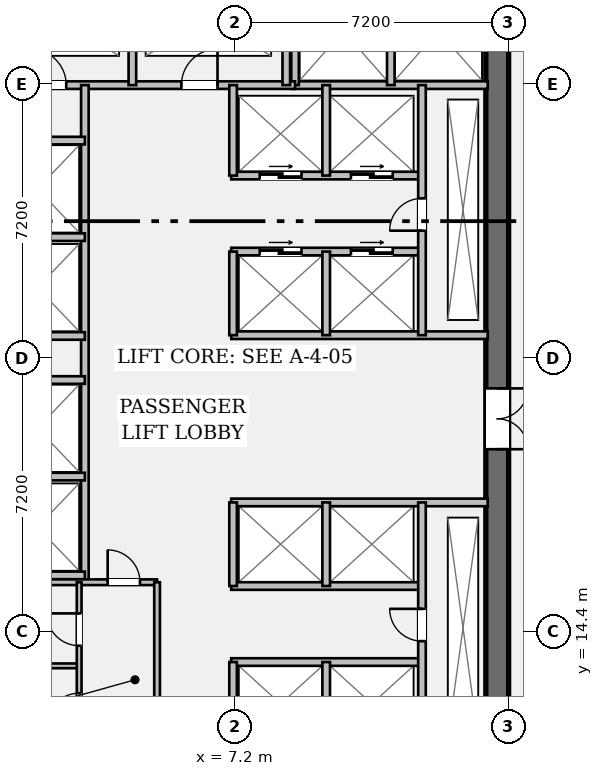
"""IFC4 building model, lengths in metres.
Left out: names, types, materials, properties, quantities, classifications, styles, units other than length and angle.
Written with IfcOpenShell. Run it as: python <this file> out.ifc"""

import sys

from ifc_helpers import new_model, si_unit, direction, frame, frame_2d, origin, place, context, subcontext, project, spatial, rectangle, extrude, element, fill, save


model = new_model("IFC4")
c1 = context("Model", 3, precision=1e-05, world=origin(), true_north=direction((0.0, 1.0)))
c2 = subcontext(c1, "Body", "Model", "MODEL_VIEW")
j1 = project(units=[si_unit("LENGTHUNIT", "METRE"), si_unit("PLANEANGLEUNIT", "RADIAN")], contexts=[c1])
p1 = place(None, origin())
s1 = spatial("IfcSite", under=j1, at=p1, CompositionType="ELEMENT")
p2 = place(p1, origin())
s2 = spatial("IfcBuilding", under=s1, at=p2, CompositionType="ELEMENT")
p3 = place(p2, frame((0.0, 0.0, 61.95)))
s3 = spatial("IfcBuildingStorey", under=s2, at=p3, CompositionType="ELEMENT", Elevation=61.95)
p4 = place(p3, frame((14.1, 35.4, 0.0), z_axis=(0.0, 0.0, 1.0), x_axis=(0.0, -1.0, 0.0)))
e1 = element("IfcWall", 1, at=p4, inside=s3, PredefinedType="SHEAR", context=c2, shape_type="SweptSolid", body=[
    extrude(rectangle(XDim=27.6, YDim=0.6, at=frame_2d((13.8, 0.0))), origin(), (0.0, 0.0, 1.0), 3.57),
])
p5 = place(p4, frame((1.3, 0.0, 0.0)))
e2 = element("IfcOpeningElement", 2, at=p5, cuts=e1, PredefinedType="OPENING", context=c2, shape_type="SweptSolid", body=[
    extrude(rectangle(XDim=1.2, YDim=2.15, at=frame_2d((0.6, 1.075))), frame((0.0, 0.312, 0.0), z_axis=(0.0, -1.0, 0.0), x_axis=(1.0, 0.0, 0.0)), (0.0, 0.0, 1.0), 0.624),
])
p6 = place(p4, frame((25.25, 0.0, 0.0)))
e3 = element("IfcOpeningElement", 3, at=p6, cuts=e1, PredefinedType="OPENING", context=c2, shape_type="SweptSolid", body=[
    extrude(rectangle(XDim=1.2, YDim=2.15, at=frame_2d((0.6, 1.075))), frame((0.0, 0.312, 0.0), z_axis=(0.0, -1.0, 0.0), x_axis=(1.0, 0.0, 0.0)), (0.0, 0.0, 1.0), 0.624),
])
p7 = place(p4, frame((14.6, 0.0, 0.0)))
e4 = element("IfcOpeningElement", 4, at=p7, cuts=e1, PredefinedType="OPENING", context=c2, shape_type="SweptSolid", body=[
    extrude(rectangle(XDim=1.6, YDim=2.2, at=frame_2d((0.8, 1.1))), frame((0.0, 0.312, 0.0), z_axis=(0.0, -1.0, 0.0), x_axis=(1.0, 0.0, 0.0)), (0.0, 0.0, 1.0), 0.624),
])
p8 = place(p3, frame((8.7, 28.78, 0.0), z_axis=(0.0, 0.0, 1.0), x_axis=(1.0, 0.0, 0.0)))
e5 = element("IfcWall", 5, at=p8, inside=s3, PredefinedType="PARTITIONING", context=c2, shape_type="SweptSolid", body=[
    extrude(rectangle(XDim=5.15, YDim=0.2, at=frame_2d((2.575, 0.0))), origin(), (0.0, 0.0, 1.0), 3.57),
])
for number, where, z_axis, x_axis in (
    (6, (8.78, 28.78, 0.0), (0.0, 0.0, 1.0), (0.0, 1.0, 0.0)),
    (7, (11.3, 28.78, 0.0), (0.0, 0.0, 1.0), (0.0, 1.0, 0.0)),
):
    element("IfcWall", number, at=place(p3, frame(where, z_axis=z_axis, x_axis=x_axis)), inside=s3, PredefinedType="PARTITIONING", context=c2, shape_type="SweptSolid", body=[
        extrude(rectangle(XDim=3.1, YDim=0.2, at=frame_2d((1.55, 0.0))), origin(), (0.0, 0.0, 1.0), 3.57),
    ])
p9 = place(p3, frame((0.6, 28.78, 0.0), z_axis=(0.0, 0.0, 1.0), x_axis=(1.0, 0.0, 0.0)))
e8 = element("IfcWall", 8, at=p9, inside=s3, PredefinedType="PARTITIONING", context=c2, shape_type="SweptSolid", body=[
    extrude(rectangle(XDim=8.18, YDim=0.2, at=frame_2d((4.09, 0.0))), origin(), (0.0, 0.0, 1.0), 3.57),
])
p10 = place(p9, frame((1.21, 0.0, 0.0)))
e9 = element("IfcOpeningElement", 9, at=p10, cuts=e8, PredefinedType="OPENING", context=c2, shape_type="SweptSolid", body=[
    extrude(rectangle(XDim=0.95, YDim=2.15, at=frame_2d((0.475, 1.075))), frame((0.0, 0.112, 0.0), z_axis=(0.0, -1.0, 0.0), x_axis=(1.0, 0.0, 0.0)), (0.0, 0.0, 1.0), 0.224),
])
p11 = place(p9, frame((5.19, 0.0, 0.0)))
e10 = element("IfcOpeningElement", 10, at=p11, cuts=e8, PredefinedType="OPENING", context=c2, shape_type="SweptSolid", body=[
    extrude(rectangle(XDim=0.95, YDim=2.15, at=frame_2d((0.475, 1.075))), frame((0.0, 0.112, 0.0), z_axis=(0.0, -1.0, 0.0), x_axis=(1.0, 0.0, 0.0)), (0.0, 0.0, 1.0), 0.224),
])
for number, where, z_axis, x_axis in (
    (11, (4.5, 28.78, 0.0), (0.0, 0.0, 1.0), (0.0, 1.0, 0.0)),
    (12, (8.55, 28.78, 0.0), (0.0, 0.0, 1.0), (0.0, 1.0, 0.0)),
):
    element("IfcWall", number, at=place(p3, frame(where, z_axis=z_axis, x_axis=x_axis)), inside=s3, PredefinedType="PARTITIONING", context=c2, shape_type="SweptSolid", body=[
        extrude(rectangle(XDim=2.94, YDim=0.2, at=frame_2d((1.47, 0.0))), origin(), (0.0, 0.0, 1.0), 3.57),
    ])
p12 = place(p3, frame((3.25, 15.7, 0.0), z_axis=(0.0, 0.0, 1.0), x_axis=(0.0, 1.0, 0.0)))
e13 = element("IfcWall", 13, at=p12, inside=s3, PredefinedType="PARTITIONING", context=c2, shape_type="SweptSolid", body=[
    extrude(rectangle(XDim=13.08, YDim=0.2, at=frame_2d((6.54, 0.0))), origin(), (0.0, 0.0, 1.0), 3.57),
])
for number, where, z_axis, x_axis in (
    (14, (0.6, 15.88, 0.0), (0.0, 0.0, 1.0), (1.0, 0.0, 0.0)),
    (15, (0.6, 18.48, 0.0), (0.0, 0.0, 1.0), (1.0, 0.0, 0.0)),
    (16, (0.6, 22.18, 0.0), (0.0, 0.0, 1.0), (1.0, 0.0, 0.0)),
    (17, (0.6, 24.78, 0.0), (0.0, 0.0, 1.0), (1.0, 0.0, 0.0)),
    (18, (0.6, 21.02, 0.0), (0.0, 0.0, 1.0), (1.0, 0.0, 0.0)),
    (19, (0.6, 27.32, 0.0), (0.0, 0.0, 1.0), (1.0, 0.0, 0.0)),
):
    element("IfcWall", number, at=place(p3, frame(where, z_axis=z_axis, x_axis=x_axis)), inside=s3, PredefinedType="PARTITIONING", context=c2, shape_type="SweptSolid", body=[
        extrude(rectangle(XDim=2.65, YDim=0.2, at=frame_2d((1.325, 0.0))), origin(), (0.0, 0.0, 1.0), 3.57),
    ])
p13 = place(p3, frame((7.1, 22.2, 0.0), z_axis=(0.0, 0.0, 1.0), x_axis=(1.0, 0.0, 0.0)))
e20 = element("IfcWall", 20, at=p13, inside=s3, PredefinedType="PARTITIONING", context=c2, shape_type="SweptSolid", body=[
    extrude(rectangle(XDim=6.75, YDim=0.2, at=frame_2d((3.375, 0.0))), origin(), (0.0, 0.0, 1.0), 3.57),
])
p14 = place(p3, frame((7.1, 24.4, 0.0), z_axis=(0.0, 0.0, 1.0), x_axis=(1.0, 0.0, 0.0)))
e21 = element("IfcWall", 21, at=p14, inside=s3, PredefinedType="PARTITIONING", context=c2, shape_type="SweptSolid", body=[
    extrude(rectangle(XDim=5.02, YDim=0.2, at=frame_2d((2.51, 0.0))), origin(), (0.0, 0.0, 1.0), 3.57),
])
p15 = place(p14, frame((0.75, 0.0, 0.0)))
e22 = element("IfcOpeningElement", 22, at=p15, cuts=e21, PredefinedType="OPENING", context=c2, shape_type="SweptSolid", body=[
    extrude(rectangle(XDim=1.1, YDim=2.2, at=frame_2d((0.55, 1.1))), frame((0.0, 0.112, 0.0), z_axis=(0.0, -1.0, 0.0), x_axis=(1.0, 0.0, 0.0)), (0.0, 0.0, 1.0), 0.224),
])
p16 = place(p14, frame((3.15, 0.0, 0.0)))
e23 = element("IfcOpeningElement", 23, at=p16, cuts=e21, PredefinedType="OPENING", context=c2, shape_type="SweptSolid", body=[
    extrude(rectangle(XDim=1.1, YDim=2.2, at=frame_2d((0.55, 1.1))), frame((0.0, 0.112, 0.0), z_axis=(0.0, -1.0, 0.0), x_axis=(1.0, 0.0, 0.0)), (0.0, 0.0, 1.0), 0.224),
])
p17 = place(p3, frame((7.1, 26.4, 0.0), z_axis=(0.0, 0.0, 1.0), x_axis=(1.0, 0.0, 0.0)))
e24 = element("IfcWall", 24, at=p17, inside=s3, PredefinedType="PARTITIONING", context=c2, shape_type="SweptSolid", body=[
    extrude(rectangle(XDim=5.02, YDim=0.2, at=frame_2d((2.51, 0.0))), origin(), (0.0, 0.0, 1.0), 3.57),
])
p18 = place(p17, frame((0.75, 0.0, 0.0)))
e25 = element("IfcOpeningElement", 25, at=p18, cuts=e24, PredefinedType="OPENING", context=c2, shape_type="SweptSolid", body=[
    extrude(rectangle(XDim=1.1, YDim=2.2, at=frame_2d((0.55, 1.1))), frame((0.0, 0.112, 0.0), z_axis=(0.0, -1.0, 0.0), x_axis=(1.0, 0.0, 0.0)), (0.0, 0.0, 1.0), 0.224),
])
p19 = place(p17, frame((3.15, 0.0, 0.0)))
e26 = element("IfcOpeningElement", 26, at=p19, cuts=e24, PredefinedType="OPENING", context=c2, shape_type="SweptSolid", body=[
    extrude(rectangle(XDim=1.1, YDim=2.2, at=frame_2d((0.55, 1.1))), frame((0.0, 0.112, 0.0), z_axis=(0.0, -1.0, 0.0), x_axis=(1.0, 0.0, 0.0)), (0.0, 0.0, 1.0), 0.224),
])
p20 = place(p3, frame((7.15, 22.2, 0.0), z_axis=(0.0, 0.0, 1.0), x_axis=(0.0, 1.0, 0.0)))
e27 = element("IfcWall", 27, at=p20, inside=s3, PredefinedType="PARTITIONING", context=c2, shape_type="SweptSolid", body=[
    extrude(rectangle(XDim=2.2, YDim=0.2, at=frame_2d((1.1, 0.0))), origin(), (0.0, 0.0, 1.0), 3.57),
])
p21 = place(p3, frame((7.15, 26.4, 0.0), z_axis=(0.0, 0.0, 1.0), x_axis=(0.0, 1.0, 0.0)))
e28 = element("IfcWall", 28, at=p21, inside=s3, PredefinedType="PARTITIONING", context=c2, shape_type="SweptSolid", body=[
    extrude(rectangle(XDim=2.38, YDim=0.2, at=frame_2d((1.19, 0.0))), origin(), (0.0, 0.0, 1.0), 3.57),
])
p22 = place(p3, frame((9.6, 22.2, 0.0), z_axis=(0.0, 0.0, 1.0), x_axis=(0.0, 1.0, 0.0)))
e29 = element("IfcWall", 29, at=p22, inside=s3, PredefinedType="PARTITIONING", context=c2, shape_type="SweptSolid", body=[
    extrude(rectangle(XDim=2.2, YDim=0.2, at=frame_2d((1.1, 0.0))), origin(), (0.0, 0.0, 1.0), 3.57),
])
p23 = place(p3, frame((9.6, 26.4, 0.0), z_axis=(0.0, 0.0, 1.0), x_axis=(0.0, 1.0, 0.0)))
e30 = element("IfcWall", 30, at=p23, inside=s3, PredefinedType="PARTITIONING", context=c2, shape_type="SweptSolid", body=[
    extrude(rectangle(XDim=2.38, YDim=0.2, at=frame_2d((1.19, 0.0))), origin(), (0.0, 0.0, 1.0), 3.57),
])
p24 = place(p3, frame((12.12, 22.2, 0.0), z_axis=(0.0, 0.0, 1.0), x_axis=(0.0, 1.0, 0.0)))
e31 = element("IfcWall", 31, at=p24, inside=s3, PredefinedType="PARTITIONING", context=c2, shape_type="SweptSolid", body=[
    extrude(rectangle(XDim=6.58, YDim=0.2, at=frame_2d((3.29, 0.0))), origin(), (0.0, 0.0, 1.0), 3.57),
])
p25 = place(p24, frame((2.75, 0.0, 0.0)))
e32 = element("IfcOpeningElement", 32, at=p25, cuts=e31, PredefinedType="OPENING", context=c2, shape_type="SweptSolid", body=[
    extrude(rectangle(XDim=0.85, YDim=2.15, at=frame_2d((0.425, 1.075))), frame((0.0, 0.112, 0.0), z_axis=(0.0, -1.0, 0.0), x_axis=(1.0, 0.0, 0.0)), (0.0, 0.0, 1.0), 0.224),
])
p26 = place(p3, frame((7.1, 17.8, 0.0), z_axis=(0.0, 0.0, 1.0), x_axis=(1.0, 0.0, 0.0)))
e33 = element("IfcWall", 33, at=p26, inside=s3, PredefinedType="PARTITIONING", context=c2, shape_type="SweptSolid", body=[
    extrude(rectangle(XDim=6.75, YDim=0.2, at=frame_2d((3.375, 0.0))), origin(), (0.0, 0.0, 1.0), 3.57),
])
for number, where, z_axis, x_axis in (
    (34, (7.1, 15.6, 0.0), (0.0, 0.0, 1.0), (1.0, 0.0, 0.0)),
    (35, (7.1, 13.6, 0.0), (0.0, 0.0, 1.0), (1.0, 0.0, 0.0)),
):
    element("IfcWall", number, at=place(p3, frame(where, z_axis=z_axis, x_axis=x_axis)), inside=s3, PredefinedType="PARTITIONING", context=c2, shape_type="SweptSolid", body=[
        extrude(rectangle(XDim=5.02, YDim=0.2, at=frame_2d((2.51, 0.0))), origin(), (0.0, 0.0, 1.0), 3.57),
    ])
p27 = place(p3, frame((7.15, 15.6, 0.0), z_axis=(0.0, 0.0, 1.0), x_axis=(0.0, 1.0, 0.0)))
e36 = element("IfcWall", 36, at=p27, inside=s3, PredefinedType="PARTITIONING", context=c2, shape_type="SweptSolid", body=[
    extrude(rectangle(XDim=2.2, YDim=0.2, at=frame_2d((1.1, 0.0))), origin(), (0.0, 0.0, 1.0), 3.57),
])
p28 = place(p3, frame((7.15, 11.2, 0.0), z_axis=(0.0, 0.0, 1.0), x_axis=(0.0, 1.0, 0.0)))
e37 = element("IfcWall", 37, at=p28, inside=s3, PredefinedType="PARTITIONING", context=c2, shape_type="SweptSolid", body=[
    extrude(rectangle(XDim=2.4, YDim=0.2, at=frame_2d((1.2, 0.0))), origin(), (0.0, 0.0, 1.0), 3.57),
])
p29 = place(p3, frame((9.6, 15.6, 0.0), z_axis=(0.0, 0.0, 1.0), x_axis=(0.0, 1.0, 0.0)))
e38 = element("IfcWall", 38, at=p29, inside=s3, PredefinedType="PARTITIONING", context=c2, shape_type="SweptSolid", body=[
    extrude(rectangle(XDim=2.2, YDim=0.2, at=frame_2d((1.1, 0.0))), origin(), (0.0, 0.0, 1.0), 3.57),
])
p30 = place(p3, frame((9.6, 11.2, 0.0), z_axis=(0.0, 0.0, 1.0), x_axis=(0.0, 1.0, 0.0)))
e39 = element("IfcWall", 39, at=p30, inside=s3, PredefinedType="PARTITIONING", context=c2, shape_type="SweptSolid", body=[
    extrude(rectangle(XDim=2.4, YDim=0.2, at=frame_2d((1.2, 0.0))), origin(), (0.0, 0.0, 1.0), 3.57),
])
p31 = place(p3, frame((12.12, 11.2, 0.0), z_axis=(0.0, 0.0, 1.0), x_axis=(0.0, 1.0, 0.0)))
e40 = element("IfcWall", 40, at=p31, inside=s3, PredefinedType="PARTITIONING", context=c2, shape_type="SweptSolid", body=[
    extrude(rectangle(XDim=6.6, YDim=0.2, at=frame_2d((3.3, 0.0))), origin(), (0.0, 0.0, 1.0), 3.57),
])
p32 = place(p31, frame((2.95, 0.0, 0.0)))
e41 = element("IfcOpeningElement", 41, at=p32, cuts=e40, PredefinedType="OPENING", context=c2, shape_type="SweptSolid", body=[
    extrude(rectangle(XDim=0.85, YDim=2.15, at=frame_2d((0.425, 1.075))), frame((0.0, 0.112, 0.0), z_axis=(0.0, -1.0, 0.0), x_axis=(1.0, 0.0, 0.0)), (0.0, 0.0, 1.0), 0.224),
])
p33 = place(p3, frame((0.6, 15.7, 0.0), z_axis=(0.0, 0.0, 1.0), x_axis=(1.0, 0.0, 0.0)))
e42 = element("IfcWall", 42, at=p33, inside=s3, PredefinedType="PARTITIONING", context=c2, shape_type="SweptSolid", body=[
    extrude(rectangle(XDim=4.55, YDim=0.15, at=frame_2d((2.275, 0.0))), origin(), (0.0, 0.0, 1.0), 3.57),
])
p34 = place(p33, frame((3.25, 0.0, 0.0)))
e43 = element("IfcOpeningElement", 43, at=p34, cuts=e42, PredefinedType="OPENING", context=c2, shape_type="SweptSolid", body=[
    extrude(rectangle(XDim=0.85, YDim=2.15, at=frame_2d((0.425, 1.075))), frame((0.0, 0.087, 0.0), z_axis=(0.0, -1.0, 0.0), x_axis=(1.0, 0.0, 0.0)), (0.0, 0.0, 1.0), 0.174),
])
p35 = place(p3, frame((5.15, 11.28, 0.0), z_axis=(0.0, 0.0, 1.0), x_axis=(0.0, 1.0, 0.0)))
e44 = element("IfcWall", 44, at=p35, inside=s3, PredefinedType="PARTITIONING", context=c2, shape_type="SweptSolid", body=[
    extrude(rectangle(XDim=4.42, YDim=0.15, at=frame_2d((2.21, 0.0))), origin(), (0.0, 0.0, 1.0), 3.57),
])
p36 = place(p3, frame((0.6, 13.5, 0.0), z_axis=(0.0, 0.0, 1.0), x_axis=(1.0, 0.0, 0.0)))
e45 = element("IfcWall", 45, at=p36, inside=s3, PredefinedType="PARTITIONING", context=c2, shape_type="SweptSolid", body=[
    extrude(rectangle(XDim=2.5, YDim=0.125, at=frame_2d((1.25, 0.0))), origin(), (0.0, 0.0, 1.0), 3.57),
])
p37 = place(p3, frame((3.1, 11.28, 0.0), z_axis=(0.0, 0.0, 1.0), x_axis=(0.0, 1.0, 0.0)))
e46 = element("IfcWall", 46, at=p37, inside=s3, PredefinedType="PARTITIONING", context=c2, shape_type="SweptSolid", body=[
    extrude(rectangle(XDim=4.42, YDim=0.125, at=frame_2d((2.21, 0.0))), origin(), (0.0, 0.0, 1.0), 3.57),
])
p38 = place(p37, frame((0.65, 0.0, 0.0)))
e47 = element("IfcOpeningElement", 47, at=p38, cuts=e46, PredefinedType="OPENING", context=c2, shape_type="SweptSolid", body=[
    extrude(rectangle(XDim=0.85, YDim=2.15, at=frame_2d((0.425, 1.075))), frame((0.0, 0.074, 0.0), z_axis=(0.0, -1.0, 0.0), x_axis=(1.0, 0.0, 0.0)), (0.0, 0.0, 1.0), 0.149),
])
p39 = place(p37, frame((2.75, 0.0, 0.0)))
e48 = element("IfcOpeningElement", 48, at=p39, cuts=e46, PredefinedType="OPENING", context=c2, shape_type="SweptSolid", body=[
    extrude(rectangle(XDim=0.85, YDim=2.15, at=frame_2d((0.425, 1.075))), frame((0.0, 0.074, 0.0), z_axis=(0.0, -1.0, 0.0), x_axis=(1.0, 0.0, 0.0)), (0.0, 0.0, 1.0), 0.149),
])
p40 = place(p10, origin())
e49 = element("IfcDoor", 49, at=p40, inside=s3, OperationType="SINGLE_SWING_LEFT", PredefinedType="DOOR", context=c2, shape_type="SweptSolid", body=[
    extrude(rectangle(XDim=0.95, YDim=2.15, at=frame_2d((0.475, 1.075))), frame((0.0, 0.025, 0.0), z_axis=(0.0, -1.0, 0.0), x_axis=(1.0, 0.0, 0.0)), (0.0, 0.0, 1.0), 0.05),
])
fill(e9, e49)
p41 = place(p11, origin())
e50 = element("IfcDoor", 50, at=p41, inside=s3, OperationType="SINGLE_SWING_RIGHT", PredefinedType="DOOR", context=c2, shape_type="SweptSolid", body=[
    extrude(rectangle(XDim=0.95, YDim=2.15, at=frame_2d((0.475, 1.075))), frame((0.0, 0.025, 0.0), z_axis=(0.0, -1.0, 0.0), x_axis=(1.0, 0.0, 0.0)), (0.0, 0.0, 1.0), 0.05),
])
fill(e10, e50)
p42 = place(p7, origin())
e51 = element("IfcDoor", 51, at=p42, inside=s3, OperationType="DOUBLE_DOOR_SINGLE_SWING", PredefinedType="DOOR", context=c2, shape_type="SweptSolid", body=[
    extrude(rectangle(XDim=1.6, YDim=2.2, at=frame_2d((0.8, 1.1))), frame((0.0, 0.025, 0.0), z_axis=(0.0, -1.0, 0.0), x_axis=(1.0, 0.0, 0.0)), (0.0, 0.0, 1.0), 0.05),
])
fill(e4, e51)
p43 = place(p25, origin())
e52 = element("IfcDoor", 52, at=p43, inside=s3, OperationType="SINGLE_SWING_LEFT", PredefinedType="DOOR", context=c2, shape_type="SweptSolid", body=[
    extrude(rectangle(XDim=0.85, YDim=2.15, at=frame_2d((0.425, 1.075))), frame((0.0, 0.025, 0.0), z_axis=(0.0, -1.0, 0.0), x_axis=(1.0, 0.0, 0.0)), (0.0, 0.0, 1.0), 0.05),
])
fill(e32, e52)
p44 = place(p15, origin())
e53 = element("IfcDoor", 53, at=p44, inside=s3, OperationType="DOUBLE_DOOR_SLIDING", PredefinedType="DOOR", context=c2, shape_type="SweptSolid", body=[
    extrude(rectangle(XDim=1.1, YDim=2.2, at=frame_2d((0.55, 1.1))), frame((0.0, 0.025, 0.0), z_axis=(0.0, -1.0, 0.0), x_axis=(1.0, 0.0, 0.0)), (0.0, 0.0, 1.0), 0.05),
])
fill(e22, e53)
p45 = place(p16, origin())
e54 = element("IfcDoor", 54, at=p45, inside=s3, OperationType="DOUBLE_DOOR_SLIDING", PredefinedType="DOOR", context=c2, shape_type="SweptSolid", body=[
    extrude(rectangle(XDim=1.1, YDim=2.2, at=frame_2d((0.55, 1.1))), frame((0.0, 0.025, 0.0), z_axis=(0.0, -1.0, 0.0), x_axis=(1.0, 0.0, 0.0)), (0.0, 0.0, 1.0), 0.05),
])
fill(e23, e54)
p46 = place(p18, origin())
e55 = element("IfcDoor", 55, at=p46, inside=s3, OperationType="DOUBLE_DOOR_SLIDING", PredefinedType="DOOR", context=c2, shape_type="SweptSolid", body=[
    extrude(rectangle(XDim=1.1, YDim=2.2, at=frame_2d((0.55, 1.1))), frame((0.0, 0.025, 0.0), z_axis=(0.0, -1.0, 0.0), x_axis=(1.0, 0.0, 0.0)), (0.0, 0.0, 1.0), 0.05),
])
fill(e25, e55)
p47 = place(p19, origin())
e56 = element("IfcDoor", 56, at=p47, inside=s3, OperationType="DOUBLE_DOOR_SLIDING", PredefinedType="DOOR", context=c2, shape_type="SweptSolid", body=[
    extrude(rectangle(XDim=1.1, YDim=2.2, at=frame_2d((0.55, 1.1))), frame((0.0, 0.025, 0.0), z_axis=(0.0, -1.0, 0.0), x_axis=(1.0, 0.0, 0.0)), (0.0, 0.0, 1.0), 0.05),
])
fill(e26, e56)
p48 = place(p32, origin())
e57 = element("IfcDoor", 57, at=p48, inside=s3, OperationType="SINGLE_SWING_RIGHT", PredefinedType="DOOR", context=c2, shape_type="SweptSolid", body=[
    extrude(rectangle(XDim=0.85, YDim=2.15, at=frame_2d((0.425, 1.075))), frame((0.0, 0.025, 0.0), z_axis=(0.0, -1.0, 0.0), x_axis=(1.0, 0.0, 0.0)), (0.0, 0.0, 1.0), 0.05),
])
fill(e41, e57)
p49 = place(p34, origin())
e58 = element("IfcDoor", 58, at=p49, inside=s3, OperationType="SINGLE_SWING_LEFT", PredefinedType="DOOR", context=c2, shape_type="SweptSolid", body=[
    extrude(rectangle(XDim=0.85, YDim=2.15, at=frame_2d((0.425, 1.075))), frame((0.0, 0.025, 0.0), z_axis=(0.0, -1.0, 0.0), x_axis=(1.0, 0.0, 0.0)), (0.0, 0.0, 1.0), 0.05),
])
fill(e43, e58)
p50 = place(p38, origin())
e59 = element("IfcDoor", 59, at=p50, inside=s3, OperationType="SINGLE_SWING_LEFT", PredefinedType="DOOR", context=c2, shape_type="SweptSolid", body=[
    extrude(rectangle(XDim=0.85, YDim=2.15, at=frame_2d((0.425, 1.075))), frame((0.0, 0.025, 0.0), z_axis=(0.0, -1.0, 0.0), x_axis=(1.0, 0.0, 0.0)), (0.0, 0.0, 1.0), 0.05),
])
fill(e47, e59)
p51 = place(p39, origin())
e60 = element("IfcDoor", 60, at=p51, inside=s3, OperationType="SINGLE_SWING_RIGHT", PredefinedType="DOOR", context=c2, shape_type="SweptSolid", body=[
    extrude(rectangle(XDim=0.85, YDim=2.15, at=frame_2d((0.425, 1.075))), frame((0.0, 0.025, 0.0), z_axis=(0.0, -1.0, 0.0), x_axis=(1.0, 0.0, 0.0)), (0.0, 0.0, 1.0), 0.05),
])
fill(e48, e60)
save(model, sys.argv[1])
